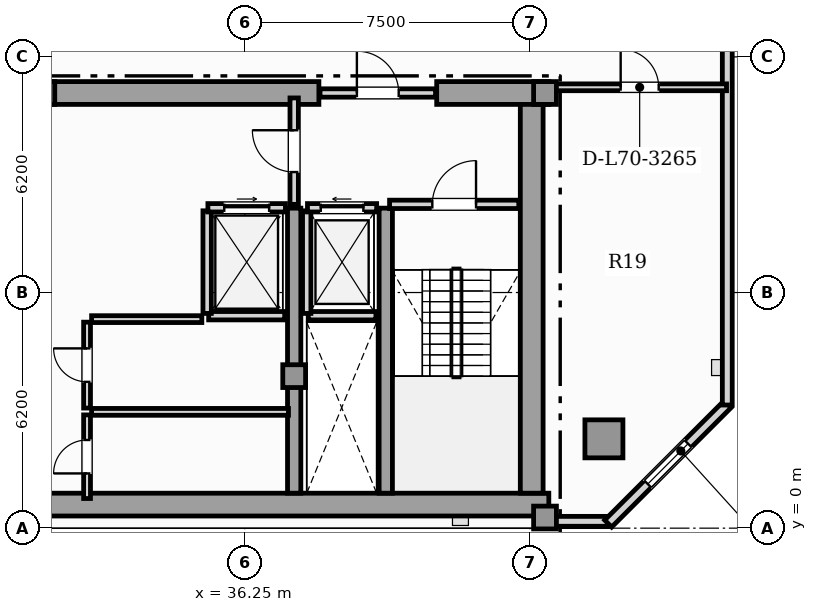
"""IFC4 building model, lengths in metres.
Left out: names, types, materials, properties, quantities, classifications, styles, units other than length and angle.
Written with IfcOpenShell. Run it as: python <this file> out.ifc"""

import sys

from ifc_helpers import new_model, si_unit, direction, frame, frame_2d, origin, origin_2d, place, context, subcontext, project, spatial, rectangle, hollow_rectangle, extrude, element, fill, save


model = new_model("IFC4")
c1 = context("Model", 3, precision=1e-05, world=origin(), true_north=direction((0.0, 1.0)))
c2 = subcontext(c1, "Body", "Model", "MODEL_VIEW")
j1 = project(units=[si_unit("LENGTHUNIT", "METRE"), si_unit("PLANEANGLEUNIT", "RADIAN")], contexts=[c1])
p1 = place(None, origin())
s1 = spatial("IfcSite", under=j1, at=p1, CompositionType="ELEMENT")
p2 = place(p1, origin())
s2 = spatial("IfcBuilding", under=s1, at=p2, CompositionType="ELEMENT")
p3 = place(p2, frame((0.0, 0.0, 284.9)))
s3 = spatial("IfcBuildingStorey", under=s2, at=p3, CompositionType="ELEMENT", Elevation=284.9)
p4 = place(p3, frame((13.25, 0.62, 0.0), z_axis=(0.0, 0.0, 1.0), x_axis=(1.0, 0.0, 0.0)))
e1 = element("IfcWall", 1, at=p4, inside=s3, PredefinedType="SHEAR", context=c2, shape_type="SweptSolid", body=[
    extrude(rectangle(XDim=31.0, YDim=0.6, at=frame_2d((15.5, 0.0))), origin(), (0.0, 0.0, 1.0), 3.65),
])
p5 = place(p3, frame((43.8, 0.92, 0.0), z_axis=(0.0, 0.0, 1.0), x_axis=(0.0, 1.0, 0.0)))
e2 = element("IfcWall", 2, at=p5, inside=s3, PredefinedType="SHEAR", context=c2, shape_type="SweptSolid", body=[
    extrude(rectangle(XDim=10.53, YDim=0.6, at=frame_2d((5.265, 0.0))), origin(), (0.0, 0.0, 1.0), 3.65),
])
p6 = place(p3, frame((30.9, 11.45, 0.0), z_axis=(0.0, 0.0, 1.0), x_axis=(1.0, 0.0, 0.0)))
e3 = element("IfcWall", 3, at=p6, inside=s3, PredefinedType="SHEAR", context=c2, shape_type="SweptSolid", body=[
    extrude(rectangle(XDim=7.3, YDim=0.6, at=frame_2d((3.65, 0.0))), origin(), (0.0, 0.0, 1.0), 3.65),
])
p7 = place(p3, frame((41.3, 11.45, 0.0), z_axis=(0.0, 0.0, 1.0), x_axis=(1.0, 0.0, 0.0)))
e4 = element("IfcWall", 4, at=p7, inside=s3, PredefinedType="SHEAR", context=c2, shape_type="SweptSolid", body=[
    extrude(rectangle(XDim=2.95, YDim=0.6, at=frame_2d((1.475, 0.0))), origin(), (0.0, 0.0, 1.0), 3.65),
])
for number, where, z_axis, x_axis in (
    (5, (37.55, 0.92, 0.0), (0.0, 0.0, 1.0), (0.0, 1.0, 0.0)),
    (6, (39.96, 0.92, 0.0), (0.0, 0.0, 1.0), (0.0, 1.0, 0.0)),
):
    element("IfcWall", number, at=place(p3, frame(where, z_axis=z_axis, x_axis=x_axis)), inside=s3, PredefinedType="SHEAR", context=c2, shape_type="SweptSolid", body=[
        extrude(rectangle(XDim=7.5, YDim=0.35, at=frame_2d((3.75, 0.0))), origin(), (0.0, 0.0, 1.0), 3.65),
    ])
for number, where, z_axis, x_axis in (
    (7, (44.15, 0.28, 0.0), (0.0, 0.0, 1.0), (1.0, 0.0, 0.0)),
    (8, (44.15, 11.45, 0.0), (0.0, 0.0, 1.0), (1.0, 0.0, 0.0)),
    (9, (37.55, 4.0, 0.0), (0.0, 0.0, 1.0), (1.0, 0.0, 0.0)),
    (10, (30.95, 11.45, 0.0), (0.0, 0.0, 1.0), (1.0, 0.0, 0.0)),
):
    element("IfcColumn", number, at=place(p3, frame(where, z_axis=z_axis, x_axis=x_axis)), inside=s3, PredefinedType="COLUMN", context=c2, shape_type="SweptSolid", body=[
        extrude(rectangle(XDim=0.6, YDim=0.6, at=origin_2d()), origin(), (0.0, 0.0, 1.0), 3.85),
    ])
p8 = place(p3, frame((45.7, 2.35, 0.0), z_axis=(0.0, 0.0, 1.0), x_axis=(1.0, 0.0, 0.0)))
e11 = element("IfcColumn", 11, at=p8, inside=s3, PredefinedType="USERDEFINED", context=c2, shape_type="SweptSolid", body=[
    extrude(hollow_rectangle(XDim=1.0, YDim=1.0, WallThickness=0.06, at=origin_2d()), origin(), (0.0, 0.0, 1.0), 3.85),
])
p9 = place(p3, frame((44.25, 0.18, 0.0), z_axis=(0.0, 0.0, 1.0), x_axis=(1.0, 0.0, 0.0)))
e12 = element("IfcWall", 12, at=p9, inside=s3, PredefinedType="SOLIDWALL", context=c2, shape_type="SweptSolid", body=[
    extrude(rectangle(XDim=1.586, YDim=0.26, at=frame_2d((0.793, 0.0))), origin(), (0.0, 0.0, 1.0), 3.65),
])
p10 = place(p3, frame((45.812, 0.12, 0.0), z_axis=(0.0, 0.0, 1.0), x_axis=(0.707079321262, 0.707134240044, 0.0)))
e13 = element("IfcWall", 13, at=p10, inside=s3, PredefinedType="SOLIDWALL", context=c2, shape_type="SweptSolid", body=[
    extrude(rectangle(XDim=4.446, YDim=0.26, at=frame_2d((2.223, 0.0))), origin(), (0.0, 0.0, 1.0), 3.65),
])
p11 = place(p10, frame((1.473, 0.0, 0.9)))
e14 = element("IfcOpeningElement", 14, at=p11, cuts=e13, PredefinedType="OPENING", context=c2, shape_type="SweptSolid", body=[
    extrude(rectangle(XDim=1.5, YDim=1.95, at=frame_2d((0.75, 0.975))), frame((0.0, 0.14, 0.0), z_axis=(0.0, -1.0, 0.0), x_axis=(1.0, 0.0, 0.0)), (0.0, 0.0, 1.0), 0.28),
])
p12 = place(p3, frame((48.946, 3.24, 0.0), z_axis=(0.0, 0.0, 1.0), x_axis=(0.0, 1.0, 0.0)))
e15 = element("IfcWall", 15, at=p12, inside=s3, PredefinedType="SOLIDWALL", context=c2, shape_type="SweptSolid", body=[
    extrude(rectangle(XDim=14.383, YDim=0.26, at=frame_2d((7.192, 0.0))), origin(), (0.0, 0.0, 1.0), 3.65),
])
p13 = place(p12, frame((11.055, 0.0, 0.95)))
e16 = element("IfcOpeningElement", 16, at=p13, cuts=e15, PredefinedType="OPENING", context=c2, shape_type="SweptSolid", body=[
    extrude(rectangle(XDim=0.9, YDim=1.5, at=frame_2d((0.45, 0.75))), frame((0.0, 0.14, 0.0), z_axis=(0.0, -1.0, 0.0), x_axis=(1.0, 0.0, 0.0)), (0.0, 0.0, 1.0), 0.28),
])
p14 = place(p3, frame((37.92, 5.59, 0.0), z_axis=(0.0, 0.0, 1.0), x_axis=(1.0, 0.0, 0.0)))
e17 = element("IfcWall", 17, at=p14, inside=s3, PredefinedType="SOLIDWALL", context=c2, shape_type="SweptSolid", body=[
    extrude(rectangle(XDim=1.78, YDim=0.22, at=frame_2d((0.89, 0.0))), origin(), (0.0, 0.0, 1.0), 3.65),
])
p15 = place(p3, frame((37.88, 5.65, 0.0), z_axis=(0.0, 0.0, 1.0), x_axis=(0.0, 1.0, 0.0)))
e18 = element("IfcWall", 18, at=p15, inside=s3, PredefinedType="SOLIDWALL", context=c2, shape_type="SweptSolid", body=[
    extrude(rectangle(XDim=2.7, YDim=0.22, at=frame_2d((1.35, 0.0))), origin(), (0.0, 0.0, 1.0), 3.65),
])
p16 = place(p3, frame((37.9, 8.43, 0.0), z_axis=(0.0, 0.0, 1.0), x_axis=(1.0, 0.0, 0.0)))
e19 = element("IfcWall", 19, at=p16, inside=s3, PredefinedType="SOLIDWALL", context=c2, shape_type="SweptSolid", body=[
    extrude(rectangle(XDim=1.82, YDim=0.22, at=frame_2d((0.91, 0.0))), origin(), (0.0, 0.0, 1.0), 3.65),
])
p17 = place(p16, frame((0.35, 0.0, 0.0)))
e20 = element("IfcOpeningElement", 20, at=p17, cuts=e19, PredefinedType="OPENING", context=c2, shape_type="SweptSolid", body=[
    extrude(rectangle(XDim=1.12, YDim=2.25, at=frame_2d((0.56, 1.125))), frame((0.0, 0.12, 0.0), z_axis=(0.0, -1.0, 0.0), x_axis=(1.0, 0.0, 0.0)), (0.0, 0.0, 1.0), 0.24),
])
p18 = place(p3, frame((35.3, 5.59, 0.0), z_axis=(0.0, 0.0, 1.0), x_axis=(1.0, 0.0, 0.0)))
e21 = element("IfcWall", 21, at=p18, inside=s3, PredefinedType="SOLIDWALL", context=c2, shape_type="SweptSolid", body=[
    extrude(rectangle(XDim=2.0, YDim=0.22, at=frame_2d((1.0, 0.0))), origin(), (0.0, 0.0, 1.0), 3.65),
])
p19 = place(p3, frame((35.26, 5.65, 0.0), z_axis=(0.0, 0.0, 1.0), x_axis=(0.0, 1.0, 0.0)))
e22 = element("IfcWall", 22, at=p19, inside=s3, PredefinedType="SOLIDWALL", context=c2, shape_type="SweptSolid", body=[
    extrude(rectangle(XDim=2.7, YDim=0.22, at=frame_2d((1.35, 0.0))), origin(), (0.0, 0.0, 1.0), 3.65),
])
p20 = place(p3, frame((35.28, 8.43, 0.0), z_axis=(0.0, 0.0, 1.0), x_axis=(1.0, 0.0, 0.0)))
e23 = element("IfcWall", 23, at=p20, inside=s3, PredefinedType="SOLIDWALL", context=c2, shape_type="SweptSolid", body=[
    extrude(rectangle(XDim=2.04, YDim=0.22, at=frame_2d((1.02, 0.0))), origin(), (0.0, 0.0, 1.0), 3.65),
])
p21 = place(p20, frame((0.43, 0.0, 0.0)))
e24 = element("IfcOpeningElement", 24, at=p21, cuts=e23, PredefinedType="OPENING", context=c2, shape_type="SweptSolid", body=[
    extrude(rectangle(XDim=1.18, YDim=2.2, at=frame_2d((0.59, 1.1))), frame((0.0, 0.12, 0.0), z_axis=(0.0, -1.0, 0.0), x_axis=(1.0, 0.0, 0.0)), (0.0, 0.0, 1.0), 0.24),
])
p22 = place(p3, frame((40.06, 8.52, 0.0), z_axis=(0.0, 0.0, 1.0), x_axis=(1.0, 0.0, 0.0)))
e25 = element("IfcWall", 25, at=p22, inside=s3, PredefinedType="SOLIDWALL", context=c2, shape_type="SweptSolid", body=[
    extrude(rectangle(XDim=3.4, YDim=0.22, at=frame_2d((1.7, 0.0))), origin(), (0.0, 0.0, 1.0), 3.65),
])
p23 = place(p22, frame((1.125, 0.0, 0.0)))
e26 = element("IfcOpeningElement", 26, at=p23, cuts=e25, PredefinedType="OPENING", context=c2, shape_type="SweptSolid", body=[
    extrude(rectangle(XDim=1.15, YDim=2.2, at=frame_2d((0.575, 1.1))), frame((0.0, 0.12, 0.0), z_axis=(0.0, -1.0, 0.0), x_axis=(1.0, 0.0, 0.0)), (0.0, 0.0, 1.0), 0.24),
])
p24 = place(p3, frame((37.55, 8.52, 0.0), z_axis=(0.0, 0.0, 1.0), x_axis=(0.0, 1.0, 0.0)))
e27 = element("IfcWall", 27, at=p24, inside=s3, PredefinedType="SOLIDWALL", context=c2, shape_type="SweptSolid", body=[
    extrude(rectangle(XDim=2.8, YDim=0.22, at=frame_2d((1.4, 0.0))), origin(), (0.0, 0.0, 1.0), 3.106),
])
p25 = place(p24, frame((0.85, 0.0, 0.0)))
e28 = element("IfcOpeningElement", 28, at=p25, cuts=e27, PredefinedType="OPENING", context=c2, shape_type="SweptSolid", body=[
    extrude(rectangle(XDim=1.1, YDim=2.2, at=frame_2d((0.55, 1.1))), frame((0.0, 0.12, 0.0), z_axis=(0.0, -1.0, 0.0), x_axis=(1.0, 0.0, 0.0)), (0.0, 0.0, 1.0), 0.24),
])
p26 = place(p3, frame((38.23, 11.45, 0.0), z_axis=(0.0, 0.0, 1.0), x_axis=(1.0, 0.0, 0.0)))
e29 = element("IfcWall", 29, at=p26, inside=s3, PredefinedType="SOLIDWALL", context=c2, shape_type="SweptSolid", body=[
    extrude(rectangle(XDim=3.04, YDim=0.22, at=frame_2d((1.52, 0.0))), origin(), (0.0, 0.0, 1.0), 3.65),
])
p27 = place(p26, frame((0.97, 0.0, 0.0)))
e30 = element("IfcOpeningElement", 30, at=p27, cuts=e29, PredefinedType="OPENING", context=c2, shape_type="SweptSolid", body=[
    extrude(rectangle(XDim=1.1, YDim=2.2, at=frame_2d((0.55, 1.1))), frame((0.0, 0.12, 0.0), z_axis=(0.0, -1.0, 0.0), x_axis=(1.0, 0.0, 0.0)), (0.0, 0.0, 1.0), 0.24),
])
p28 = place(p3, frame((32.1, 0.78, 0.0), z_axis=(0.0, 0.0, 1.0), x_axis=(0.0, 1.0, 0.0)))
e31 = element("IfcWall", 31, at=p28, inside=s3, PredefinedType="PARTITIONING", context=c2, shape_type="SweptSolid", body=[
    extrude(rectangle(XDim=2.2, YDim=0.18, at=frame_2d((1.1, 0.0))), origin(), (0.0, 0.0, 1.0), 3.65),
])
p29 = place(p28, frame((0.66, 0.0, 0.0)))
e32 = element("IfcOpeningElement", 32, at=p29, cuts=e31, PredefinedType="OPENING", context=c2, shape_type="SweptSolid", body=[
    extrude(rectangle(XDim=0.88, YDim=2.05, at=frame_2d((0.44, 1.025))), frame((0.0, 0.1, 0.0), z_axis=(0.0, -1.0, 0.0), x_axis=(1.0, 0.0, 0.0)), (0.0, 0.0, 1.0), 0.2),
])
p30 = place(p3, frame((32.22, 3.06, 0.0), z_axis=(0.0, 0.0, 1.0), x_axis=(1.0, 0.0, 0.0)))
e33 = element("IfcWall", 33, at=p30, inside=s3, PredefinedType="PARTITIONING", context=c2, shape_type="SweptSolid", body=[
    extrude(rectangle(XDim=5.18, YDim=0.18, at=frame_2d((2.59, 0.0))), origin(), (0.0, 0.0, 1.0), 3.65),
])
p31 = place(p3, frame((32.1, 3.16, 0.0), z_axis=(0.0, 0.0, 1.0), x_axis=(0.0, 1.0, 0.0)))
e34 = element("IfcWall", 34, at=p31, inside=s3, PredefinedType="PARTITIONING", context=c2, shape_type="SweptSolid", body=[
    extrude(rectangle(XDim=2.26, YDim=0.18, at=frame_2d((1.13, 0.0))), origin(), (0.0, 0.0, 1.0), 3.65),
])
p32 = place(p31, frame((0.69, 0.0, 0.0)))
e35 = element("IfcOpeningElement", 35, at=p32, cuts=e34, PredefinedType="OPENING", context=c2, shape_type="SweptSolid", body=[
    extrude(rectangle(XDim=0.88, YDim=2.05, at=frame_2d((0.44, 1.025))), frame((0.0, 0.1, 0.0), z_axis=(0.0, -1.0, 0.0), x_axis=(1.0, 0.0, 0.0)), (0.0, 0.0, 1.0), 0.2),
])
p33 = place(p3, frame((32.22, 5.5, 0.0), z_axis=(0.0, 0.0, 1.0), x_axis=(1.0, 0.0, 0.0)))
e36 = element("IfcWall", 36, at=p33, inside=s3, PredefinedType="PARTITIONING", context=c2, shape_type="SweptSolid", body=[
    extrude(rectangle(XDim=2.9, YDim=0.18, at=frame_2d((1.45, 0.0))), origin(), (0.0, 0.0, 1.0), 3.65),
])
p34 = place(p3, frame((44.355, 11.6, 0.0), z_axis=(0.0, 0.0, 1.0), x_axis=(1.0, 0.0, 0.0)))
e37 = element("IfcWall", 37, at=p34, inside=s3, PredefinedType="PARTITIONING", context=c2, shape_type="SweptSolid", body=[
    extrude(rectangle(XDim=4.571, YDim=0.18, at=frame_2d((2.286, 0.0))), origin(), (0.0, 0.0, 1.0), 3.65),
])
p35 = place(p34, frame((1.786, 0.0, 0.0)))
e38 = element("IfcOpeningElement", 38, at=p35, cuts=e37, PredefinedType="OPENING", context=c2, shape_type="SweptSolid", body=[
    extrude(rectangle(XDim=1.0, YDim=2.15, at=frame_2d((0.5, 1.075))), frame((0.0, 0.1, 0.0), z_axis=(0.0, -1.0, 0.0), x_axis=(1.0, 0.0, 0.0)), (0.0, 0.0, 1.0), 0.2),
])
p36 = place(p11, origin())
e39 = element("IfcWindow", 39, at=p36, inside=s3, PartitioningType="SINGLE_PANEL", PredefinedType="WINDOW", context=c2, shape_type="SweptSolid", body=[
    extrude(rectangle(XDim=1.5, YDim=1.95, at=frame_2d((0.75, 0.975))), frame((0.0, 0.03, 0.0), z_axis=(0.0, -1.0, 0.0), x_axis=(1.0, 0.0, 0.0)), (0.0, 0.0, 1.0), 0.06),
])
fill(e14, e39)
p37 = place(p17, origin())
e40 = element("IfcDoor", 40, at=p37, inside=s3, OperationType="SLIDING_TO_LEFT", PredefinedType="DOOR", context=c2, shape_type="SweptSolid", body=[
    extrude(rectangle(XDim=1.12, YDim=2.25, at=frame_2d((0.56, 1.125))), frame((0.0, 0.025, 0.0), z_axis=(0.0, -1.0, 0.0), x_axis=(1.0, 0.0, 0.0)), (0.0, 0.0, 1.0), 0.05),
])
fill(e20, e40)
p38 = place(p21, origin())
e41 = element("IfcDoor", 41, at=p38, inside=s3, OperationType="SLIDING_TO_RIGHT", PredefinedType="DOOR", context=c2, shape_type="SweptSolid", body=[
    extrude(rectangle(XDim=1.18, YDim=2.2, at=frame_2d((0.59, 1.1))), frame((0.0, 0.025, 0.0), z_axis=(0.0, -1.0, 0.0), x_axis=(1.0, 0.0, 0.0)), (0.0, 0.0, 1.0), 0.05),
])
fill(e24, e41)
p39 = place(p23, origin())
e42 = element("IfcDoor", 42, at=p39, inside=s3, OperationType="SINGLE_SWING_RIGHT", PredefinedType="DOOR", context=c2, shape_type="SweptSolid", body=[
    extrude(rectangle(XDim=1.15, YDim=2.2, at=frame_2d((0.575, 1.1))), frame((0.0, 0.025, 0.0), z_axis=(0.0, -1.0, 0.0), x_axis=(1.0, 0.0, 0.0)), (0.0, 0.0, 1.0), 0.05),
])
fill(e26, e42)
p40 = place(p25, origin())
e43 = element("IfcDoor", 43, at=p40, inside=s3, OperationType="SINGLE_SWING_RIGHT", PredefinedType="DOOR", context=c2, shape_type="SweptSolid", body=[
    extrude(rectangle(XDim=1.1, YDim=2.2, at=frame_2d((0.55, 1.1))), frame((0.0, 0.025, 0.0), z_axis=(0.0, -1.0, 0.0), x_axis=(1.0, 0.0, 0.0)), (0.0, 0.0, 1.0), 0.05),
])
fill(e28, e43)
p41 = place(p27, origin())
e44 = element("IfcDoor", 44, at=p41, inside=s3, OperationType="SINGLE_SWING_LEFT", PredefinedType="DOOR", context=c2, shape_type="SweptSolid", body=[
    extrude(rectangle(XDim=1.1, YDim=2.2, at=frame_2d((0.55, 1.1))), frame((0.0, 0.025, 0.0), z_axis=(0.0, -1.0, 0.0), x_axis=(1.0, 0.0, 0.0)), (0.0, 0.0, 1.0), 0.05),
])
fill(e30, e44)
p42 = place(p29, origin())
e45 = element("IfcDoor", 45, at=p42, inside=s3, OperationType="SINGLE_SWING_LEFT", PredefinedType="DOOR", context=c2, shape_type="SweptSolid", body=[
    extrude(rectangle(XDim=0.88, YDim=2.05, at=frame_2d((0.44, 1.025))), frame((0.0, 0.025, 0.0), z_axis=(0.0, -1.0, 0.0), x_axis=(1.0, 0.0, 0.0)), (0.0, 0.0, 1.0), 0.05),
])
fill(e32, e45)
p43 = place(p32, origin())
e46 = element("IfcDoor", 46, at=p43, inside=s3, OperationType="SINGLE_SWING_RIGHT", PredefinedType="DOOR", context=c2, shape_type="SweptSolid", body=[
    extrude(rectangle(XDim=0.88, YDim=2.05, at=frame_2d((0.44, 1.025))), frame((0.0, 0.025, 0.0), z_axis=(0.0, -1.0, 0.0), x_axis=(1.0, 0.0, 0.0)), (0.0, 0.0, 1.0), 0.05),
])
fill(e35, e46)
p44 = place(p35, origin())
e47 = element("IfcDoor", 47, at=p44, inside=s3, OperationType="SINGLE_SWING_LEFT", PredefinedType="DOOR", context=c2, shape_type="SweptSolid", body=[
    extrude(rectangle(XDim=1.0, YDim=2.15, at=frame_2d((0.5, 1.075))), frame((0.0, 0.025, 0.0), z_axis=(0.0, -1.0, 0.0), x_axis=(1.0, 0.0, 0.0)), (0.0, 0.0, 1.0), 0.05),
])
fill(e38, e47)
save(model, sys.argv[1])
